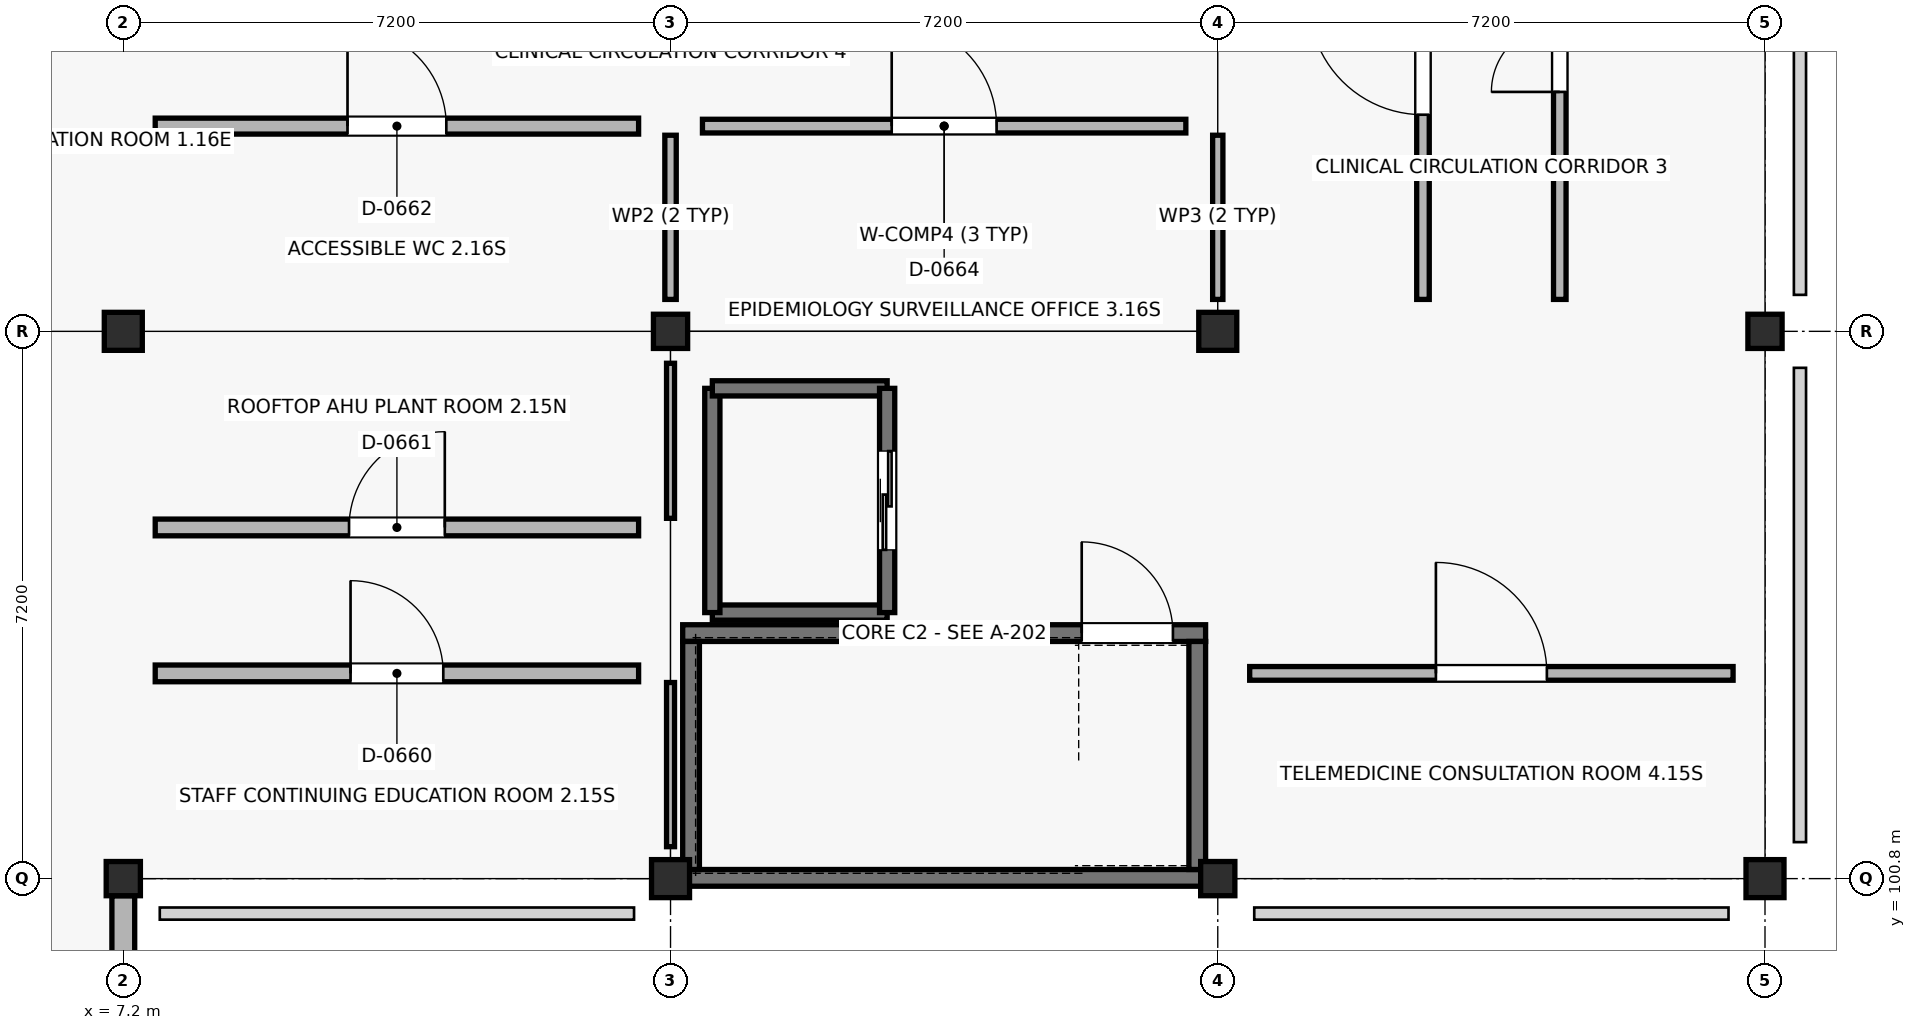
"""IFC4 building model, lengths in metres.
Left out: names, types, materials, properties, quantities, classifications, styles, units other than length and angle.
Written with IfcOpenShell. Run it as: python <this file> out.ifc"""

import sys

from ifc_helpers import new_model, si_unit, direction, frame, frame_2d, origin, origin_2d, place, context, subcontext, project, spatial, rectangle, extrude, element, fill, save


model = new_model("IFC4")
c1 = context("Model", 3, precision=1e-05, world=origin(), true_north=direction((0.0, 1.0)))
c2 = subcontext(c1, "Body", "Model", "MODEL_VIEW")
j1 = project(units=[si_unit("LENGTHUNIT", "METRE"), si_unit("PLANEANGLEUNIT", "RADIAN")], contexts=[c1])
p1 = place(None, origin())
s1 = spatial("IfcSite", under=j1, at=p1, CompositionType="ELEMENT")
p2 = place(p1, origin())
s2 = spatial("IfcBuilding", under=s1, at=p2, CompositionType="ELEMENT")
p3 = place(p2, frame((0.0, 0.0, 21.6)))
s3 = spatial("IfcBuildingStorey", under=s2, at=p3, CompositionType="ELEMENT", Elevation=21.6)
p4 = place(p3, frame((7.2, 100.8, 0.0), z_axis=(0.0, 0.0, 1.0), x_axis=(1.0, 0.0, 0.0)))
e1 = element("IfcColumn", 1, at=p4, inside=s3, PredefinedType="COLUMN", context=c2, shape_type="SweptSolid", body=[
    extrude(rectangle(XDim=0.45, YDim=0.45, at=origin_2d()), origin(), (0.0, 0.0, 1.0), 3.83),
])
for number, where, z_axis, x_axis in (
    (2, (7.2, 108.0, 0.0), (0.0, 0.0, 1.0), (1.0, 0.0, 0.0)),
    (3, (14.4, 100.8, 0.0), (0.0, 0.0, 1.0), (1.0, 0.0, 0.0)),
):
    element("IfcColumn", number, at=place(p3, frame(where, z_axis=z_axis, x_axis=x_axis)), inside=s3, PredefinedType="COLUMN", context=c2, shape_type="SweptSolid", body=[
        extrude(rectangle(XDim=0.5, YDim=0.5, at=origin_2d()), origin(), (0.0, 0.0, 1.0), 3.83),
    ])
for number, where, z_axis, x_axis in (
    (4, (14.4, 108.0, 0.0), (0.0, 0.0, 1.0), (1.0, 0.0, 0.0)),
    (5, (21.6, 100.8, 0.0), (0.0, 0.0, 1.0), (1.0, 0.0, 0.0)),
):
    element("IfcColumn", number, at=place(p3, frame(where, z_axis=z_axis, x_axis=x_axis)), inside=s3, PredefinedType="COLUMN", context=c2, shape_type="SweptSolid", body=[
        extrude(rectangle(XDim=0.45, YDim=0.45, at=origin_2d()), origin(), (0.0, 0.0, 1.0), 3.83),
    ])
for number, where, z_axis, x_axis in (
    (6, (21.6, 108.0, 0.0), (0.0, 0.0, 1.0), (1.0, 0.0, 0.0)),
    (7, (28.8, 100.8, 0.0), (0.0, 0.0, 1.0), (1.0, 0.0, 0.0)),
):
    element("IfcColumn", number, at=place(p3, frame(where, z_axis=z_axis, x_axis=x_axis)), inside=s3, PredefinedType="COLUMN", context=c2, shape_type="SweptSolid", body=[
        extrude(rectangle(XDim=0.5, YDim=0.5, at=origin_2d()), origin(), (0.0, 0.0, 1.0), 3.83),
    ])
p5 = place(p3, frame((28.8, 108.0, 0.0), z_axis=(0.0, 0.0, 1.0), x_axis=(1.0, 0.0, 0.0)))
e8 = element("IfcColumn", 8, at=p5, inside=s3, PredefinedType="COLUMN", context=c2, shape_type="SweptSolid", body=[
    extrude(rectangle(XDim=0.45, YDim=0.45, at=origin_2d()), origin(), (0.0, 0.0, 1.0), 3.83),
])
p6 = place(p3, frame((7.2, 93.85, 0.0), z_axis=(0.0, 0.0, 1.0), x_axis=(0.0, 1.0, 0.0)))
e9 = element("IfcWall", 9, at=p6, inside=s3, PredefinedType="STANDARD", context=c2, shape_type="SweptSolid", body=[
    extrude(rectangle(XDim=6.725, YDim=0.3, at=frame_2d((3.362, 0.0))), origin(), (0.0, 0.0, 1.0), 3.28),
])
p7 = place(p3, frame((14.56, 100.81, 0.0), z_axis=(0.0, 0.0, 1.0), x_axis=(1.0, 0.0, 0.0)))
e10 = element("IfcWall", 10, at=p7, inside=s3, PredefinedType="SHEAR", context=c2, shape_type="SweptSolid", body=[
    extrude(rectangle(XDim=6.88, YDim=0.22, at=frame_2d((3.44, 0.0))), origin(), (0.0, 0.0, 1.0), 3.83),
])
p8 = place(p3, frame((14.56, 104.03, 0.0), z_axis=(0.0, 0.0, 1.0), x_axis=(1.0, 0.0, 0.0)))
e11 = element("IfcWall", 11, at=p8, inside=s3, PredefinedType="SHEAR", context=c2, shape_type="SweptSolid", body=[
    extrude(rectangle(XDim=6.88, YDim=0.22, at=frame_2d((3.44, 0.0))), origin(), (0.0, 0.0, 1.0), 3.83),
])
p9 = place(p8, frame((5.25, 0.0, 0.0)))
e12 = element("IfcOpeningElement", 12, at=p9, cuts=e11, PredefinedType="OPENING", context=c2, shape_type="SweptSolid", body=[
    extrude(rectangle(XDim=1.2, YDim=2.15, at=frame_2d((0.6, 1.075))), frame((0.0, 0.12, 0.0), z_axis=(0.0, -1.0, 0.0), x_axis=(1.0, 0.0, 0.0)), (0.0, 0.0, 1.0), 0.24),
])
for number, where, z_axis, x_axis in (
    (13, (14.67, 100.92, 0.0), (0.0, 0.0, 1.0), (0.0, 1.0, 0.0)),
    (14, (21.33, 100.92, 0.0), (0.0, 0.0, 1.0), (0.0, 1.0, 0.0)),
):
    element("IfcWall", number, at=place(p3, frame(where, z_axis=z_axis, x_axis=x_axis)), inside=s3, PredefinedType="SHEAR", context=c2, shape_type="SweptSolid", body=[
        extrude(rectangle(XDim=3.0, YDim=0.22, at=frame_2d((1.5, 0.0))), origin(), (0.0, 0.0, 1.0), 3.83),
    ])
p10 = place(p3, frame((14.95, 104.3, 0.0), z_axis=(0.0, 0.0, 1.0), x_axis=(1.0, 0.0, 0.0)))
e15 = element("IfcWall", 15, at=p10, inside=s3, PredefinedType="SHEAR", context=c2, shape_type="SweptSolid", body=[
    extrude(rectangle(XDim=2.3, YDim=0.2, at=frame_2d((1.15, 0.0))), origin(), (0.0, 0.0, 1.0), 4.05),
])
p11 = place(p3, frame((14.95, 104.3, 0.0), z_axis=(0.0, 0.0, 1.0), x_axis=(0.0, 1.0, 0.0)))
e16 = element("IfcWall", 16, at=p11, inside=s3, PredefinedType="SHEAR", context=c2, shape_type="SweptSolid", body=[
    extrude(rectangle(XDim=2.95, YDim=0.2, at=frame_2d((1.475, 0.0))), origin(), (0.0, 0.0, 1.0), 4.05),
])
p12 = place(p3, frame((14.95, 107.25, 0.0), z_axis=(0.0, 0.0, 1.0), x_axis=(1.0, 0.0, 0.0)))
e17 = element("IfcWall", 17, at=p12, inside=s3, PredefinedType="SHEAR", context=c2, shape_type="SweptSolid", body=[
    extrude(rectangle(XDim=2.3, YDim=0.2, at=frame_2d((1.15, 0.0))), origin(), (0.0, 0.0, 1.0), 4.05),
])
p13 = place(p3, frame((17.25, 104.3, 0.0), z_axis=(0.0, 0.0, 1.0), x_axis=(0.0, 1.0, 0.0)))
e18 = element("IfcWall", 18, at=p13, inside=s3, PredefinedType="SHEAR", context=c2, shape_type="SweptSolid", body=[
    extrude(rectangle(XDim=2.95, YDim=0.2, at=frame_2d((1.475, 0.0))), origin(), (0.0, 0.0, 1.0), 4.05),
])
p14 = place(p13, frame((0.825, 0.0, 0.0)))
e19 = element("IfcOpeningElement", 19, at=p14, cuts=e18, PredefinedType="OPENING", context=c2, shape_type="SweptSolid", body=[
    extrude(rectangle(XDim=1.3, YDim=2.15, at=frame_2d((0.65, 1.075))), frame((0.0, 0.11, 0.0), z_axis=(0.0, -1.0, 0.0), x_axis=(1.0, 0.0, 0.0)), (0.0, 0.0, 1.0), 0.22),
])
p15 = place(p3, frame((7.62, 103.5, 0.0), z_axis=(0.0, 0.0, 1.0), x_axis=(1.0, 0.0, 0.0)))
e20 = element("IfcWall", 20, at=p15, inside=s3, PredefinedType="SOLIDWALL", context=c2, shape_type="SweptSolid", body=[
    extrude(rectangle(XDim=6.36, YDim=0.22, at=frame_2d((3.18, 0.0))), origin(), (0.0, 0.0, 1.0), 2.97),
])
p16 = place(p15, frame((2.57, 0.0, 0.0)))
e21 = element("IfcOpeningElement", 21, at=p16, cuts=e20, PredefinedType="OPENING", context=c2, shape_type="SweptSolid", body=[
    extrude(rectangle(XDim=1.22, YDim=2.09, at=frame_2d((0.61, 1.045))), frame((0.0, 0.12, 0.0), z_axis=(0.0, -1.0, 0.0), x_axis=(1.0, 0.0, 0.0)), (0.0, 0.0, 1.0), 0.24),
])
p17 = place(p3, frame((14.4, 101.22, 0.0), z_axis=(0.0, 0.0, 1.0), x_axis=(0.0, 1.0, 0.0)))
e22 = element("IfcWall", 22, at=p17, inside=s3, PredefinedType="PARTITIONING", context=c2, shape_type="SweptSolid", body=[
    extrude(rectangle(XDim=2.16, YDim=0.105, at=frame_2d((1.08, 0.0))), origin(), (0.0, 0.0, 1.0), 2.97),
])
p18 = place(p3, frame((7.62, 105.42, 0.0), z_axis=(0.0, 0.0, 1.0), x_axis=(1.0, 0.0, 0.0)))
e23 = element("IfcWall", 23, at=p18, inside=s3, PredefinedType="SOLIDWALL", context=c2, shape_type="SweptSolid", body=[
    extrude(rectangle(XDim=6.36, YDim=0.22, at=frame_2d((3.18, 0.0))), origin(), (0.0, 0.0, 1.0), 2.97),
])
p19 = place(p18, frame((2.55, 0.0, 0.0)))
e24 = element("IfcOpeningElement", 24, at=p19, cuts=e23, PredefinedType="OPENING", context=c2, shape_type="SweptSolid", body=[
    extrude(rectangle(XDim=1.26, YDim=2.09, at=frame_2d((0.63, 1.045))), frame((0.0, 0.12, 0.0), z_axis=(0.0, -1.0, 0.0), x_axis=(1.0, 0.0, 0.0)), (0.0, 0.0, 1.0), 0.24),
])
p20 = place(p3, frame((14.4, 105.54, 0.0), z_axis=(0.0, 0.0, 1.0), x_axis=(0.0, 1.0, 0.0)))
e25 = element("IfcWall", 25, at=p20, inside=s3, PredefinedType="PARTITIONING", context=c2, shape_type="SweptSolid", body=[
    extrude(rectangle(XDim=2.04, YDim=0.105, at=frame_2d((1.02, 0.0))), origin(), (0.0, 0.0, 1.0), 2.97),
])
p21 = place(p3, frame((7.62, 110.7, 0.0), z_axis=(0.0, 0.0, 1.0), x_axis=(1.0, 0.0, 0.0)))
e26 = element("IfcWall", 26, at=p21, inside=s3, PredefinedType="PLUMBINGWALL", context=c2, shape_type="SweptSolid", body=[
    extrude(rectangle(XDim=6.36, YDim=0.21, at=frame_2d((3.18, 0.0))), origin(), (0.0, 0.0, 1.0), 2.97),
])
p22 = place(p21, frame((2.53, 0.0, 0.0)))
e27 = element("IfcOpeningElement", 27, at=p22, cuts=e26, PredefinedType="OPENING", context=c2, shape_type="SweptSolid", body=[
    extrude(rectangle(XDim=1.3, YDim=2.09, at=frame_2d((0.65, 1.045))), frame((0.0, 0.115, 0.0), z_axis=(0.0, -1.0, 0.0), x_axis=(1.0, 0.0, 0.0)), (0.0, 0.0, 1.0), 0.23),
])
p23 = place(p3, frame((14.4, 108.42, 0.0), z_axis=(0.0, 0.0, 1.0), x_axis=(0.0, 1.0, 0.0)))
e28 = element("IfcWall", 28, at=p23, inside=s3, PredefinedType="PARTITIONING", context=c2, shape_type="SweptSolid", body=[
    extrude(rectangle(XDim=2.16, YDim=0.15, at=frame_2d((1.08, 0.0))), origin(), (0.0, 0.0, 1.0), 2.97),
])
p24 = place(p3, frame((14.82, 110.7, 0.0), z_axis=(0.0, 0.0, 1.0), x_axis=(1.0, 0.0, 0.0)))
e29 = element("IfcWall", 29, at=p24, inside=s3, PredefinedType="PARTITIONING", context=c2, shape_type="SweptSolid", body=[
    extrude(rectangle(XDim=6.36, YDim=0.18, at=frame_2d((3.18, 0.0))), origin(), (0.0, 0.0, 1.0), 2.97),
])
p25 = place(p24, frame((2.49, 0.0, 0.0)))
e30 = element("IfcOpeningElement", 30, at=p25, cuts=e29, PredefinedType="OPENING", context=c2, shape_type="SweptSolid", body=[
    extrude(rectangle(XDim=1.38, YDim=2.09, at=frame_2d((0.69, 1.045))), frame((0.0, 0.1, 0.0), z_axis=(0.0, -1.0, 0.0), x_axis=(1.0, 0.0, 0.0)), (0.0, 0.0, 1.0), 0.2),
])
p26 = place(p3, frame((21.6, 108.42, 0.0), z_axis=(0.0, 0.0, 1.0), x_axis=(0.0, 1.0, 0.0)))
e31 = element("IfcWall", 31, at=p26, inside=s3, PredefinedType="PARTITIONING", context=c2, shape_type="SweptSolid", body=[
    extrude(rectangle(XDim=2.16, YDim=0.135, at=frame_2d((1.08, 0.0))), origin(), (0.0, 0.0, 1.0), 2.97),
])
p27 = place(p3, frame((22.02, 103.5, 0.0), z_axis=(0.0, 0.0, 1.0), x_axis=(1.0, 0.0, 0.0)))
e32 = element("IfcWall", 32, at=p27, inside=s3, PredefinedType="PARTITIONING", context=c2, shape_type="SweptSolid", body=[
    extrude(rectangle(XDim=6.36, YDim=0.18, at=frame_2d((3.18, 0.0))), origin(), (0.0, 0.0, 1.0), 2.97),
])
p28 = place(p27, frame((2.45, 0.0, 0.0)))
e33 = element("IfcOpeningElement", 33, at=p28, cuts=e32, PredefinedType="OPENING", context=c2, shape_type="SweptSolid", body=[
    extrude(rectangle(XDim=1.46, YDim=2.09, at=frame_2d((0.73, 1.045))), frame((0.0, 0.1, 0.0), z_axis=(0.0, -1.0, 0.0), x_axis=(1.0, 0.0, 0.0)), (0.0, 0.0, 1.0), 0.2),
])
p29 = place(p3, frame((24.3, 108.42, 0.0), z_axis=(0.0, 0.0, 1.0), x_axis=(0.0, 1.0, 0.0)))
e34 = element("IfcWall", 34, at=p29, inside=s3, PredefinedType="PARTITIONING", context=c2, shape_type="SweptSolid", body=[
    extrude(rectangle(XDim=6.36, YDim=0.165, at=frame_2d((3.18, 0.0))), origin(), (0.0, 0.0, 1.0), 2.97),
])
p30 = place(p29, frame((2.43, 0.0, 0.0)))
e35 = element("IfcOpeningElement", 35, at=p30, cuts=e34, PredefinedType="OPENING", context=c2, shape_type="SweptSolid", body=[
    extrude(rectangle(XDim=1.5, YDim=2.09, at=frame_2d((0.75, 1.045))), frame((0.0, 0.093, 0.0), z_axis=(0.0, -1.0, 0.0), x_axis=(1.0, 0.0, 0.0)), (0.0, 0.0, 1.0), 0.185),
])
p31 = place(p3, frame((26.1, 108.42, 0.0), z_axis=(0.0, 0.0, 1.0), x_axis=(0.0, 1.0, 0.0)))
e36 = element("IfcWall", 36, at=p31, inside=s3, PredefinedType="PARTITIONING", context=c2, shape_type="SweptSolid", body=[
    extrude(rectangle(XDim=6.36, YDim=0.165, at=frame_2d((3.18, 0.0))), origin(), (0.0, 0.0, 1.0), 2.97),
])
p32 = place(p31, frame((2.73, 0.0, 0.0)))
e37 = element("IfcOpeningElement", 37, at=p32, cuts=e36, PredefinedType="OPENING", context=c2, shape_type="SweptSolid", body=[
    extrude(rectangle(XDim=0.9, YDim=2.14, at=frame_2d((0.45, 1.07))), frame((0.0, 0.093, 0.0), z_axis=(0.0, -1.0, 0.0), x_axis=(1.0, 0.0, 0.0)), (0.0, 0.0, 1.0), 0.185),
])
p33 = place(p9, origin())
e38 = element("IfcDoor", 38, at=p33, inside=s3, OperationType="SINGLE_SWING_LEFT", PredefinedType="DOOR", context=c2, shape_type="SweptSolid", body=[
    extrude(rectangle(XDim=1.2, YDim=2.15, at=frame_2d((0.6, 1.075))), frame((0.0, 0.025, 0.0), z_axis=(0.0, -1.0, 0.0), x_axis=(1.0, 0.0, 0.0)), (0.0, 0.0, 1.0), 0.05),
])
fill(e12, e38)
p34 = place(p14, origin())
e39 = element("IfcDoor", 39, at=p34, inside=s3, OperationType="SLIDING_TO_LEFT", PredefinedType="DOOR", context=c2, shape_type="SweptSolid", body=[
    extrude(rectangle(XDim=1.3, YDim=2.15, at=frame_2d((0.65, 1.075))), frame((0.0, 0.025, 0.0), z_axis=(0.0, -1.0, 0.0), x_axis=(1.0, 0.0, 0.0)), (0.0, 0.0, 1.0), 0.05),
])
fill(e19, e39)
p35 = place(p16, origin())
e40 = element("IfcDoor", 40, at=p35, inside=s3, OperationType="SINGLE_SWING_LEFT", PredefinedType="DOOR", context=c2, shape_type="SweptSolid", body=[
    extrude(rectangle(XDim=1.22, YDim=2.09, at=frame_2d((0.61, 1.045))), frame((0.0, 0.025, 0.0), z_axis=(0.0, -1.0, 0.0), x_axis=(1.0, 0.0, 0.0)), (0.0, 0.0, 1.0), 0.05),
])
fill(e21, e40)
p36 = place(p19, origin())
e41 = element("IfcDoor", 41, at=p36, inside=s3, OperationType="SINGLE_SWING_RIGHT", PredefinedType="DOOR", context=c2, shape_type="SweptSolid", body=[
    extrude(rectangle(XDim=1.26, YDim=2.09, at=frame_2d((0.63, 1.045))), frame((0.0, 0.025, 0.0), z_axis=(0.0, -1.0, 0.0), x_axis=(1.0, 0.0, 0.0)), (0.0, 0.0, 1.0), 0.05),
])
fill(e24, e41)
p37 = place(p22, origin())
e42 = element("IfcDoor", 42, at=p37, inside=s3, OperationType="SINGLE_SWING_LEFT", PredefinedType="DOOR", context=c2, shape_type="SweptSolid", body=[
    extrude(rectangle(XDim=1.3, YDim=2.09, at=frame_2d((0.65, 1.045))), frame((0.0, 0.025, 0.0), z_axis=(0.0, -1.0, 0.0), x_axis=(1.0, 0.0, 0.0)), (0.0, 0.0, 1.0), 0.05),
])
fill(e27, e42)
p38 = place(p25, origin())
e43 = element("IfcDoor", 43, at=p38, inside=s3, OperationType="SINGLE_SWING_LEFT", PredefinedType="DOOR", context=c2, shape_type="SweptSolid", body=[
    extrude(rectangle(XDim=1.38, YDim=2.09, at=frame_2d((0.69, 1.045))), frame((0.0, 0.025, 0.0), z_axis=(0.0, -1.0, 0.0), x_axis=(1.0, 0.0, 0.0)), (0.0, 0.0, 1.0), 0.05),
])
fill(e30, e43)
p39 = place(p28, origin())
e44 = element("IfcDoor", 44, at=p39, inside=s3, OperationType="SINGLE_SWING_LEFT", PredefinedType="DOOR", context=c2, shape_type="SweptSolid", body=[
    extrude(rectangle(XDim=1.46, YDim=2.09, at=frame_2d((0.73, 1.045))), frame((0.0, 0.025, 0.0), z_axis=(0.0, -1.0, 0.0), x_axis=(1.0, 0.0, 0.0)), (0.0, 0.0, 1.0), 0.05),
])
fill(e33, e44)
p40 = place(p30, origin())
e45 = element("IfcDoor", 45, at=p40, inside=s3, OperationType="SINGLE_SWING_RIGHT", PredefinedType="DOOR", context=c2, shape_type="SweptSolid", body=[
    extrude(rectangle(XDim=1.5, YDim=2.09, at=frame_2d((0.75, 1.045))), frame((0.0, 0.025, 0.0), z_axis=(0.0, -1.0, 0.0), x_axis=(1.0, 0.0, 0.0)), (0.0, 0.0, 1.0), 0.05),
])
fill(e35, e45)
p41 = place(p32, origin())
e46 = element("IfcDoor", 46, at=p41, inside=s3, OperationType="SINGLE_SWING_LEFT", PredefinedType="DOOR", context=c2, shape_type="SweptSolid", body=[
    extrude(rectangle(XDim=0.9, YDim=2.14, at=frame_2d((0.45, 1.07))), frame((0.0, 0.025, 0.0), z_axis=(0.0, -1.0, 0.0), x_axis=(1.0, 0.0, 0.0)), (0.0, 0.0, 1.0), 0.05),
])
fill(e37, e46)
save(model, sys.argv[1])
